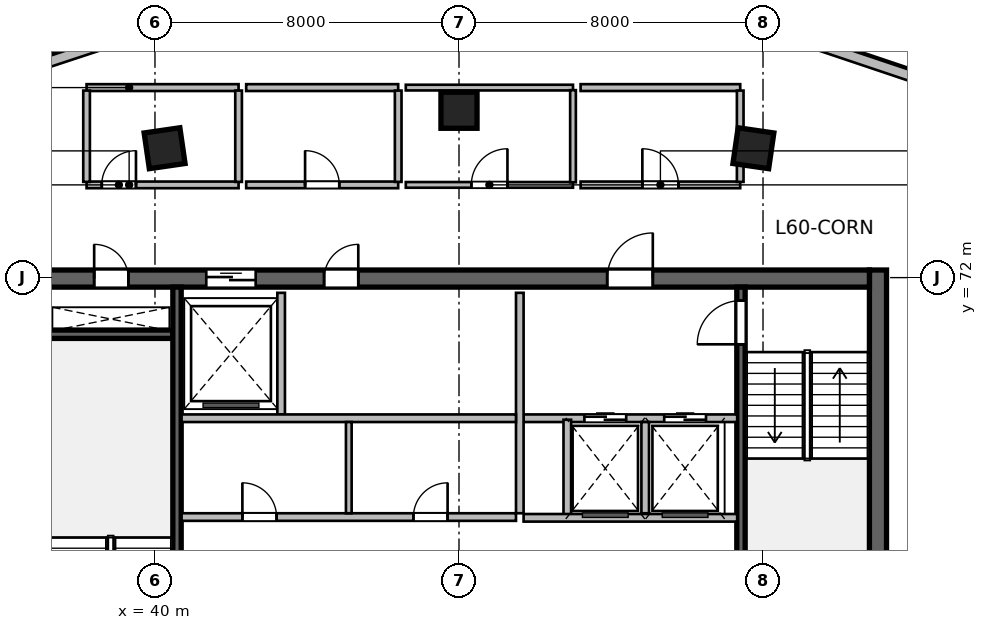
"""IFC4 building model, lengths in metres.
Left out: names, types, materials, properties, quantities, classifications, styles, units other than length and angle.
Written with IfcOpenShell. Run it as: python <this file> out.ifc"""

import sys

from ifc_helpers import new_model, si_unit, direction, frame, frame_2d, origin, origin_2d, place, context, subcontext, project, spatial, rectangle, extrude, source, transform, mapped, element, fill, save


model = new_model("IFC4")
c1 = context("Model", 3, precision=1e-05, world=origin(), true_north=direction((0.0, 1.0)))
c2 = subcontext(c1, "Body", "Model", "MODEL_VIEW")
j1 = project(units=[si_unit("LENGTHUNIT", "METRE"), si_unit("PLANEANGLEUNIT", "RADIAN")], contexts=[c1])
p1 = place(None, origin())
s1 = spatial("IfcSite", under=j1, at=p1, CompositionType="ELEMENT")
p2 = place(p1, origin())
s2 = spatial("IfcBuilding", under=s1, at=p2, CompositionType="ELEMENT")
p3 = place(p2, frame((0.0, 0.0, 246.9)))
s3 = spatial("IfcBuildingStorey", under=s2, at=p3, CompositionType="ELEMENT", Elevation=246.9)
m1 = source(origin(), c2, "Body", "SweptSolid", [
    extrude(rectangle(XDim=12.0, YDim=0.45, at=frame_2d((6.0, 0.0))), origin(), (0.0, 0.0, 1.0), 3.9),
])
p4 = place(p3, frame((59.025, 60.2, 0.0), z_axis=(0.0, 0.0, 1.0), x_axis=(0.0, 1.0, 0.0)))
e1 = element("IfcWall", 1, at=p4, inside=s3, PredefinedType="SHEAR", context=c2, shape_type="MappedRepresentation", body=[
    mapped(m1, transform((0.0, 0.0, 0.0), scale=1.0)),
])
m2 = source(origin(), c2, "Body", "SweptSolid", [
    extrude(rectangle(XDim=21.6, YDim=0.45, at=frame_2d((10.8, 0.0))), origin(), (0.0, 0.0, 1.0), 3.9),
])
p5 = place(p3, frame((37.2, 71.975, 0.0), z_axis=(0.0, 0.0, 1.0), x_axis=(1.0, 0.0, 0.0)))
e2 = element("IfcWall", 2, at=p5, inside=s3, PredefinedType="SHEAR", context=c2, shape_type="MappedRepresentation", body=[
    mapped(m2, transform((0.0, 0.0, 0.0), scale=1.0)),
])
p6 = place(p5, frame((1.2, 0.0, 0.0)))
e3 = element("IfcOpeningElement", 3, at=p6, cuts=e2, PredefinedType="OPENING", context=c2, shape_type="SweptSolid", body=[
    extrude(rectangle(XDim=0.9, YDim=2.1, at=frame_2d((0.45, 1.05))), frame((0.0, 0.235, 0.0), z_axis=(0.0, -1.0, 0.0), x_axis=(1.0, 0.0, 0.0)), (0.0, 0.0, 1.0), 0.47),
])
p7 = place(p5, frame((14.7, 0.0, 0.0)))
e4 = element("IfcOpeningElement", 4, at=p7, cuts=e2, PredefinedType="OPENING", context=c2, shape_type="SweptSolid", body=[
    extrude(rectangle(XDim=1.2, YDim=2.15, at=frame_2d((0.6, 1.075))), frame((0.0, 0.235, 0.0), z_axis=(0.0, -1.0, 0.0), x_axis=(1.0, 0.0, 0.0)), (0.0, 0.0, 1.0), 0.47),
])
p8 = place(p5, frame((4.15, 0.0, 0.0)))
e5 = element("IfcOpeningElement", 5, at=p8, cuts=e2, PredefinedType="OPENING", context=c2, shape_type="SweptSolid", body=[
    extrude(rectangle(XDim=1.3, YDim=2.15, at=frame_2d((0.65, 1.075))), frame((0.0, 0.235, 0.0), z_axis=(0.0, -1.0, 0.0), x_axis=(1.0, 0.0, 0.0)), (0.0, 0.0, 1.0), 0.47),
])
p9 = place(p5, frame((7.25, 0.0, 0.0)))
e6 = element("IfcOpeningElement", 6, at=p9, cuts=e2, PredefinedType="OPENING", context=c2, shape_type="SweptSolid", body=[
    extrude(rectangle(XDim=0.9, YDim=2.1, at=frame_2d((0.45, 1.05))), frame((0.0, 0.235, 0.0), z_axis=(0.0, -1.0, 0.0), x_axis=(1.0, 0.0, 0.0)), (0.0, 0.0, 1.0), 0.47),
])
m3 = source(origin(), c2, "Body", "SweptSolid", [
    extrude(rectangle(XDim=3.27, YDim=0.22, at=frame_2d((1.635, 0.0))), origin(), (0.0, 0.0, 1.0), 3.9),
])
p10 = place(p3, frame((37.2, 70.51, 0.0), z_axis=(0.0, 0.0, 1.0), x_axis=(1.0, 0.0, 0.0)))
e7 = element("IfcWall", 7, at=p10, inside=s3, PredefinedType="SHEAR", context=c2, shape_type="MappedRepresentation", body=[
    mapped(m3, transform((0.0, 0.0, 0.0), scale=1.0)),
])
m4 = source(origin(), c2, "Body", "SweptSolid", [
    extrude(rectangle(XDim=11.1, YDim=0.22, at=frame_2d((5.55, 0.0))), origin(), (0.0, 0.0, 1.0), 3.9),
])
p11 = place(p3, frame((40.58, 60.65, 0.0), z_axis=(0.0, 0.0, 1.0), x_axis=(0.0, 1.0, 0.0)))
e8 = element("IfcWall", 8, at=p11, inside=s3, PredefinedType="SHEAR", context=c2, shape_type="MappedRepresentation", body=[
    mapped(m4, transform((0.0, 0.0, 0.0), scale=1.0)),
])
p12 = place(p3, frame((55.42, 60.65, 0.0), z_axis=(0.0, 0.0, 1.0), x_axis=(0.0, 1.0, 0.0)))
e9 = element("IfcWall", 9, at=p12, inside=s3, PredefinedType="SHEAR", context=c2, shape_type="MappedRepresentation", body=[
    mapped(m4, transform((0.0, 0.0, 0.0), scale=1.0)),
])
p13 = place(p12, frame((9.595, 0.0, 0.0)))
e10 = element("IfcOpeningElement", 10, at=p13, cuts=e9, PredefinedType="OPENING", context=c2, shape_type="SweptSolid", body=[
    extrude(rectangle(XDim=1.15, YDim=2.15, at=frame_2d((0.575, 1.075))), frame((0.0, 0.12, 0.0), z_axis=(0.0, -1.0, 0.0), x_axis=(1.0, 0.0, 0.0)), (0.0, 0.0, 1.0), 0.24),
])
m5 = source(origin(), c2, "Body", "SweptSolid", [
    extrude(rectangle(XDim=0.95, YDim=0.95, at=origin_2d()), origin(), (0.0, 0.0, 1.0), 3.9),
])
for number, where, z_axis, x_axis in (
    (11, (40.253, 75.404, 0.0), (0.0, 0.0, 1.0), (-0.143, 0.99, 0.0)),
    (12, (48.0, 76.404, 0.0), (0.0, 0.0, 1.0), (0.0, 1.0, 0.0)),
    (13, (55.747, 75.404, 0.0), (0.0, 0.0, 1.0), (0.143, 0.99, 0.0)),
):
    element("IfcColumn", number, at=place(p3, frame(where, z_axis=z_axis, x_axis=x_axis)), inside=s3, PredefinedType="COLUMN", context=c2, shape_type="MappedRepresentation", body=[
        mapped(m5, transform((0.0, 0.0, 0.0), scale=1.0)),
    ])
m6 = source(origin(), c2, "Body", "SweptSolid", [
    extrude(rectangle(XDim=3.557, YDim=0.28, at=frame_2d((1.778, 0.0))), origin(), (0.0, 0.0, 1.0), 3.65),
])
p14 = place(p3, frame((36.077, 77.307, 0.0), z_axis=(0.0, 0.0, 1.0), x_axis=(0.949687460385, 0.31319918197, 0.0)))
e14 = element("IfcWall", 14, at=p14, inside=s3, PredefinedType="SOLIDWALL", context=c2, shape_type="MappedRepresentation", body=[
    mapped(m6, transform((0.0, 0.0, 0.0), scale=1.0)),
])
m7 = source(origin(), c2, "Body", "SweptSolid", [
    extrude(rectangle(XDim=3.559, YDim=0.28, at=frame_2d((1.78, 0.0))), origin(), (0.0, 0.0, 1.0), 3.65),
])
p15 = place(p3, frame((56.729, 78.37, 0.0), z_axis=(0.0, 0.0, 1.0), x_axis=(0.947933000453, -0.31846982063, 0.0)))
e15 = element("IfcWall", 15, at=p15, inside=s3, PredefinedType="SOLIDWALL", context=c2, shape_type="MappedRepresentation", body=[
    mapped(m7, transform((0.0, 0.0, 0.0), scale=1.0)),
])
m8 = source(origin(), c2, "Body", "SweptSolid", [
    extrude(rectangle(XDim=5.62, YDim=0.2, at=frame_2d((2.81, 0.0))), origin(), (0.0, 0.0, 1.0), 3.65),
])
p16 = place(p3, frame((49.7, 68.3, 0.0), z_axis=(0.0, 0.0, 1.0), x_axis=(1.0, 0.0, 0.0)))
e16 = element("IfcWall", 16, at=p16, inside=s3, PredefinedType="SOLIDWALL", context=c2, shape_type="MappedRepresentation", body=[
    mapped(m8, transform((0.0, 0.0, 0.0), scale=1.0)),
])
p17 = place(p16, frame((1.6, 0.0, 0.0)))
e17 = element("IfcOpeningElement", 17, at=p17, cuts=e16, PredefinedType="OPENING", context=c2, shape_type="SweptSolid", body=[
    extrude(rectangle(XDim=1.1, YDim=2.15, at=frame_2d((0.55, 1.075))), frame((0.0, 0.11, 0.0), z_axis=(0.0, -1.0, 0.0), x_axis=(1.0, 0.0, 0.0)), (0.0, 0.0, 1.0), 0.22),
])
p18 = place(p16, frame((3.7, 0.0, 0.0)))
e18 = element("IfcOpeningElement", 18, at=p18, cuts=e16, PredefinedType="OPENING", context=c2, shape_type="SweptSolid", body=[
    extrude(rectangle(XDim=1.1, YDim=2.15, at=frame_2d((0.55, 1.075))), frame((0.0, 0.11, 0.0), z_axis=(0.0, -1.0, 0.0), x_axis=(1.0, 0.0, 0.0)), (0.0, 0.0, 1.0), 0.22),
])
m9 = source(origin(), c2, "Body", "SweptSolid", [
    extrude(rectangle(XDim=5.8, YDim=0.2, at=frame_2d((2.9, 0.0))), origin(), (0.0, 0.0, 1.0), 3.65),
])
p19 = place(p3, frame((49.6, 65.8, 0.0), z_axis=(0.0, 0.0, 1.0), x_axis=(0.0, 1.0, 0.0)))
e19 = element("IfcWall", 19, at=p19, inside=s3, PredefinedType="SOLIDWALL", context=c2, shape_type="MappedRepresentation", body=[
    mapped(m9, transform((0.0, 0.0, 0.0), scale=1.0)),
])
m10 = source(origin(), c2, "Body", "SweptSolid", [
    extrude(rectangle(XDim=2.58, YDim=0.2, at=frame_2d((1.29, 0.0))), origin(), (0.0, 0.0, 1.0), 3.65),
])
p20 = place(p3, frame((50.85, 65.68, 0.0), z_axis=(0.0, 0.0, 1.0), x_axis=(0.0, 1.0, 0.0)))
e20 = element("IfcWall", 20, at=p20, inside=s3, PredefinedType="SOLIDWALL", context=c2, shape_type="MappedRepresentation", body=[
    mapped(m10, transform((0.0, 0.0, 0.0), scale=1.0)),
])
m11 = source(origin(), c2, "Body", "SweptSolid", [
    extrude(rectangle(XDim=2.4, YDim=0.2, at=frame_2d((1.2, 0.0))), origin(), (0.0, 0.0, 1.0), 3.65),
])
p21 = place(p3, frame((52.9, 65.8, 0.0), z_axis=(0.0, 0.0, 1.0), x_axis=(0.0, 1.0, 0.0)))
e21 = element("IfcWall", 21, at=p21, inside=s3, PredefinedType="SOLIDWALL", context=c2, shape_type="MappedRepresentation", body=[
    mapped(m11, transform((0.0, 0.0, 0.0), scale=1.0)),
])
p22 = place(p3, frame((49.7, 65.68, 0.0), z_axis=(0.0, 0.0, 1.0), x_axis=(1.0, 0.0, 0.0)))
e22 = element("IfcWall", 22, at=p22, inside=s3, PredefinedType="SOLIDWALL", context=c2, shape_type="MappedRepresentation", body=[
    mapped(m8, transform((0.0, 0.0, 0.0), scale=1.0)),
])
m12 = source(origin(), c2, "Body", "SweptSolid", [
    extrude(rectangle(XDim=3.2, YDim=0.2, at=frame_2d((1.6, 0.0))), origin(), (0.0, 0.0, 1.0), 3.65),
])
p23 = place(p3, frame((43.32, 68.4, 0.0), z_axis=(0.0, 0.0, 1.0), x_axis=(0.0, 1.0, 0.0)))
e23 = element("IfcWall", 23, at=p23, inside=s3, PredefinedType="SOLIDWALL", context=c2, shape_type="MappedRepresentation", body=[
    mapped(m12, transform((0.0, 0.0, 0.0), scale=1.0)),
])
m13 = source(origin(), c2, "Body", "SweptSolid", [
    extrude(rectangle(XDim=8.8, YDim=0.2, at=frame_2d((4.4, 0.0))), origin(), (0.0, 0.0, 1.0), 3.65),
])
p24 = place(p3, frame((40.7, 68.3, 0.0), z_axis=(0.0, 0.0, 1.0), x_axis=(1.0, 0.0, 0.0)))
e24 = element("IfcWall", 24, at=p24, inside=s3, PredefinedType="SOLIDWALL", context=c2, shape_type="MappedRepresentation", body=[
    mapped(m13, transform((0.0, 0.0, 0.0), scale=1.0)),
])
p25 = place(p3, frame((40.7, 65.7, 0.0), z_axis=(0.0, 0.0, 1.0), x_axis=(1.0, 0.0, 0.0)))
e25 = element("IfcWall", 25, at=p25, inside=s3, PredefinedType="SOLIDWALL", context=c2, shape_type="MappedRepresentation", body=[
    mapped(m13, transform((0.0, 0.0, 0.0), scale=1.0)),
])
p26 = place(p25, frame((1.6, 0.0, 0.0)))
e26 = element("IfcOpeningElement", 26, at=p26, cuts=e25, PredefinedType="OPENING", context=c2, shape_type="SweptSolid", body=[
    extrude(rectangle(XDim=0.9, YDim=2.1, at=frame_2d((0.45, 1.05))), frame((0.0, 0.11, 0.0), z_axis=(0.0, -1.0, 0.0), x_axis=(1.0, 0.0, 0.0)), (0.0, 0.0, 1.0), 0.22),
])
p27 = place(p25, frame((6.1, 0.0, 0.0)))
e27 = element("IfcOpeningElement", 27, at=p27, cuts=e25, PredefinedType="OPENING", context=c2, shape_type="SweptSolid", body=[
    extrude(rectangle(XDim=0.9, YDim=2.1, at=frame_2d((0.45, 1.05))), frame((0.0, 0.11, 0.0), z_axis=(0.0, -1.0, 0.0), x_axis=(1.0, 0.0, 0.0)), (0.0, 0.0, 1.0), 0.22),
])
m14 = source(origin(), c2, "Body", "SweptSolid", [
    extrude(rectangle(XDim=2.4, YDim=0.15, at=frame_2d((1.2, 0.0))), origin(), (0.0, 0.0, 1.0), 3.65),
])
p28 = place(p3, frame((45.1, 65.8, 0.0), z_axis=(0.0, 0.0, 1.0), x_axis=(0.0, 1.0, 0.0)))
e28 = element("IfcWall", 28, at=p28, inside=s3, PredefinedType="PARTITIONING", context=c2, shape_type="MappedRepresentation", body=[
    mapped(m14, transform((0.0, 0.0, 0.0), scale=1.0)),
])
m15 = source(origin(), c2, "Body", "SweptSolid", [
    extrude(rectangle(XDim=4.0, YDim=0.175, at=frame_2d((2.0, 0.0))), origin(), (0.0, 0.0, 1.0), 3.65),
])
p29 = place(p3, frame((38.2, 74.44, 0.0), z_axis=(0.0, 0.0, 1.0), x_axis=(1.0, 0.0, 0.0)))
e29 = element("IfcWall", 29, at=p29, inside=s3, PredefinedType="PARTITIONING", context=c2, shape_type="MappedRepresentation", body=[
    mapped(m15, transform((0.0, 0.0, 0.0), scale=1.0)),
])
p30 = place(p29, frame((0.4, 0.0, 0.0)))
e30 = element("IfcOpeningElement", 30, at=p30, cuts=e29, PredefinedType="OPENING", context=c2, shape_type="SweptSolid", body=[
    extrude(rectangle(XDim=0.9, YDim=2.08, at=frame_2d((0.45, 1.04))), frame((0.0, 0.098, 0.0), z_axis=(0.0, -1.0, 0.0), x_axis=(1.0, 0.0, 0.0)), (0.0, 0.0, 1.0), 0.195),
])
m16 = source(origin(), c2, "Body", "SweptSolid", [
    extrude(rectangle(XDim=4.0, YDim=0.18, at=frame_2d((2.0, 0.0))), origin(), (0.0, 0.0, 1.0), 3.65),
])
p31 = place(p3, frame((38.2, 77.0, 0.0), z_axis=(0.0, 0.0, 1.0), x_axis=(1.0, 0.0, 0.0)))
e31 = element("IfcWall", 31, at=p31, inside=s3, PredefinedType="PLUMBINGWALL", context=c2, shape_type="MappedRepresentation", body=[
    mapped(m16, transform((0.0, 0.0, 0.0), scale=1.0)),
])
m17 = source(origin(), c2, "Body", "SweptSolid", [
    extrude(rectangle(XDim=2.403, YDim=0.175, at=frame_2d((1.201, 0.0))), origin(), (0.0, 0.0, 1.0), 3.65),
])
for number, where, z_axis, x_axis in (
    (32, (38.2, 74.519, 0.0), (0.0, 0.0, 1.0), (0.0, 1.0, 0.0)),
    (33, (42.2, 74.519, 0.0), (0.0, 0.0, 1.0), (0.0, 1.0, 0.0)),
):
    element("IfcWall", number, at=place(p3, frame(where, z_axis=z_axis, x_axis=x_axis)), inside=s3, PredefinedType="PARTITIONING", context=c2, shape_type="MappedRepresentation", body=[
        mapped(m17, transform((0.0, 0.0, 0.0), scale=1.0)),
    ])
p32 = place(p3, frame((42.4, 74.44, 0.0), z_axis=(0.0, 0.0, 1.0), x_axis=(1.0, 0.0, 0.0)))
e34 = element("IfcWall", 34, at=p32, inside=s3, PredefinedType="PARTITIONING", context=c2, shape_type="MappedRepresentation", body=[
    mapped(m15, transform((0.0, 0.0, 0.0), scale=1.0)),
])
p33 = place(p32, frame((1.55, 0.0, 0.0)))
e35 = element("IfcOpeningElement", 35, at=p33, cuts=e34, PredefinedType="OPENING", context=c2, shape_type="SweptSolid", body=[
    extrude(rectangle(XDim=0.9, YDim=2.08, at=frame_2d((0.45, 1.04))), frame((0.0, 0.098, 0.0), z_axis=(0.0, -1.0, 0.0), x_axis=(1.0, 0.0, 0.0)), (0.0, 0.0, 1.0), 0.195),
])
p34 = place(p3, frame((42.4, 77.0, 0.0), z_axis=(0.0, 0.0, 1.0), x_axis=(1.0, 0.0, 0.0)))
e36 = element("IfcWall", 36, at=p34, inside=s3, PredefinedType="PLUMBINGWALL", context=c2, shape_type="MappedRepresentation", body=[
    mapped(m16, transform((0.0, 0.0, 0.0), scale=1.0)),
])
p35 = place(p3, frame((46.4, 74.519, 0.0), z_axis=(0.0, 0.0, 1.0), x_axis=(0.0, 1.0, 0.0)))
e37 = element("IfcWall", 37, at=p35, inside=s3, PredefinedType="PARTITIONING", context=c2, shape_type="MappedRepresentation", body=[
    mapped(m17, transform((0.0, 0.0, 0.0), scale=1.0)),
])
m18 = source(origin(), c2, "Body", "SweptSolid", [
    extrude(rectangle(XDim=4.4, YDim=0.15, at=frame_2d((2.2, 0.0))), origin(), (0.0, 0.0, 1.0), 3.65),
])
p36 = place(p3, frame((46.6, 74.44, 0.0), z_axis=(0.0, 0.0, 1.0), x_axis=(1.0, 0.0, 0.0)))
e38 = element("IfcWall", 38, at=p36, inside=s3, PredefinedType="PARTITIONING", context=c2, shape_type="MappedRepresentation", body=[
    mapped(m18, transform((0.0, 0.0, 0.0), scale=1.0)),
])
p37 = place(p36, frame((1.725, 0.0, 0.0)))
e39 = element("IfcOpeningElement", 39, at=p37, cuts=e38, PredefinedType="OPENING", context=c2, shape_type="SweptSolid", body=[
    extrude(rectangle(XDim=0.95, YDim=2.1, at=frame_2d((0.475, 1.05))), frame((0.0, 0.085, 0.0), z_axis=(0.0, -1.0, 0.0), x_axis=(1.0, 0.0, 0.0)), (0.0, 0.0, 1.0), 0.17),
])
p38 = place(p3, frame((46.6, 77.0, 0.0), z_axis=(0.0, 0.0, 1.0), x_axis=(1.0, 0.0, 0.0)))
e40 = element("IfcWall", 40, at=p38, inside=s3, PredefinedType="PARTITIONING", context=c2, shape_type="MappedRepresentation", body=[
    mapped(m18, transform((0.0, 0.0, 0.0), scale=1.0)),
])
m19 = source(origin(), c2, "Body", "SweptSolid", [
    extrude(rectangle(XDim=2.425, YDim=0.15, at=frame_2d((1.212, 0.0))), origin(), (0.0, 0.0, 1.0), 3.65),
])
p39 = place(p3, frame((51.0, 74.508, 0.0), z_axis=(0.0, 0.0, 1.0), x_axis=(0.0, 1.0, 0.0)))
e41 = element("IfcWall", 41, at=p39, inside=s3, PredefinedType="PARTITIONING", context=c2, shape_type="MappedRepresentation", body=[
    mapped(m19, transform((0.0, 0.0, 0.0), scale=1.0)),
])
m20 = source(origin(), c2, "Body", "SweptSolid", [
    extrude(rectangle(XDim=4.2, YDim=0.175, at=frame_2d((2.1, 0.0))), origin(), (0.0, 0.0, 1.0), 3.65),
])
p40 = place(p3, frame((51.2, 74.44, 0.0), z_axis=(0.0, 0.0, 1.0), x_axis=(1.0, 0.0, 0.0)))
e42 = element("IfcWall", 42, at=p40, inside=s3, PredefinedType="PARTITIONING", context=c2, shape_type="MappedRepresentation", body=[
    mapped(m20, transform((0.0, 0.0, 0.0), scale=1.0)),
])
p41 = place(p40, frame((1.625, 0.0, 0.0)))
e43 = element("IfcOpeningElement", 43, at=p41, cuts=e42, PredefinedType="OPENING", context=c2, shape_type="SweptSolid", body=[
    extrude(rectangle(XDim=0.95, YDim=2.12, at=frame_2d((0.475, 1.06))), frame((0.0, 0.098, 0.0), z_axis=(0.0, -1.0, 0.0), x_axis=(1.0, 0.0, 0.0)), (0.0, 0.0, 1.0), 0.195),
])
m21 = source(origin(), c2, "Body", "SweptSolid", [
    extrude(rectangle(XDim=4.2, YDim=0.18, at=frame_2d((2.1, 0.0))), origin(), (0.0, 0.0, 1.0), 3.65),
])
p42 = place(p3, frame((51.2, 77.0, 0.0), z_axis=(0.0, 0.0, 1.0), x_axis=(1.0, 0.0, 0.0)))
e44 = element("IfcWall", 44, at=p42, inside=s3, PredefinedType="PLUMBINGWALL", context=c2, shape_type="MappedRepresentation", body=[
    mapped(m21, transform((0.0, 0.0, 0.0), scale=1.0)),
])
p43 = place(p3, frame((55.4, 74.519, 0.0), z_axis=(0.0, 0.0, 1.0), x_axis=(0.0, 1.0, 0.0)))
e45 = element("IfcWall", 45, at=p43, inside=s3, PredefinedType="PARTITIONING", context=c2, shape_type="MappedRepresentation", body=[
    mapped(m17, transform((0.0, 0.0, 0.0), scale=1.0)),
])
m22 = source(origin(), c2, "Body", "SweptSolid", [
    extrude(rectangle(XDim=13.161, YDim=0.195, at=frame_2d((6.581, 0.0))), origin(), (0.0, 0.0, 1.0), 3.65),
])
p44 = place(p3, frame((59.5, 63.216, 0.0), z_axis=(0.0, 0.0, 1.0), x_axis=(0.268752541286, 0.963209256368, 0.0)))
e46 = element("IfcWall", 46, at=p44, inside=s3, PredefinedType="PARTITIONING", context=c2, shape_type="MappedRepresentation", body=[
    mapped(m22, transform((0.0, 0.0, 0.0), scale=1.0)),
])
m23 = source(origin(), c2, "Body", "SweptSolid", [
    extrude(rectangle(XDim=0.9, YDim=2.1, at=frame_2d((0.45, 1.05))), frame((0.0, 0.025, 0.0), z_axis=(0.0, -1.0, 0.0), x_axis=(1.0, 0.0, 0.0)), (0.0, 0.0, 1.0), 0.05),
])
p45 = place(p6, origin())
e47 = element("IfcDoor", 47, at=p45, inside=s3, OperationType="SINGLE_SWING_LEFT", PredefinedType="DOOR", context=c2, shape_type="MappedRepresentation", body=[
    mapped(m23, transform((0.0, 0.0, 0.0), scale=1.0)),
])
fill(e3, e47)
m24 = source(origin(), c2, "Body", "SweptSolid", [
    extrude(rectangle(XDim=1.15, YDim=2.15, at=frame_2d((0.575, 1.075))), frame((0.0, 0.025, 0.0), z_axis=(0.0, -1.0, 0.0), x_axis=(1.0, 0.0, 0.0)), (0.0, 0.0, 1.0), 0.05),
])
p46 = place(p13, origin())
e48 = element("IfcDoor", 48, at=p46, inside=s3, OperationType="SINGLE_SWING_LEFT", PredefinedType="DOOR", context=c2, shape_type="MappedRepresentation", body=[
    mapped(m24, transform((0.0, 0.0, 0.0), scale=1.0)),
])
fill(e10, e48)
m25 = source(origin(), c2, "Body", "SweptSolid", [
    extrude(rectangle(XDim=1.2, YDim=2.15, at=frame_2d((0.6, 1.075))), frame((0.0, 0.025, 0.0), z_axis=(0.0, -1.0, 0.0), x_axis=(1.0, 0.0, 0.0)), (0.0, 0.0, 1.0), 0.05),
])
p47 = place(p7, origin())
e49 = element("IfcDoor", 49, at=p47, inside=s3, OperationType="SINGLE_SWING_RIGHT", PredefinedType="DOOR", context=c2, shape_type="MappedRepresentation", body=[
    mapped(m25, transform((0.0, 0.0, 0.0), scale=1.0)),
])
fill(e4, e49)
m26 = source(origin(), c2, "Body", "SweptSolid", [
    extrude(rectangle(XDim=1.1, YDim=2.15, at=frame_2d((0.55, 1.075))), frame((0.0, 0.025, 0.0), z_axis=(0.0, -1.0, 0.0), x_axis=(1.0, 0.0, 0.0)), (0.0, 0.0, 1.0), 0.05),
])
p48 = place(p17, origin())
e50 = element("IfcDoor", 50, at=p48, inside=s3, OperationType="DOUBLE_DOOR_SLIDING", PredefinedType="DOOR", context=c2, shape_type="MappedRepresentation", body=[
    mapped(m26, transform((0.0, 0.0, 0.0), scale=1.0)),
])
fill(e17, e50)
p49 = place(p18, origin())
e51 = element("IfcDoor", 51, at=p49, inside=s3, OperationType="DOUBLE_DOOR_SLIDING", PredefinedType="DOOR", context=c2, shape_type="MappedRepresentation", body=[
    mapped(m26, transform((0.0, 0.0, 0.0), scale=1.0)),
])
fill(e18, e51)
m27 = source(origin(), c2, "Body", "SweptSolid", [
    extrude(rectangle(XDim=1.3, YDim=2.15, at=frame_2d((0.65, 1.075))), frame((0.0, 0.025, 0.0), z_axis=(0.0, -1.0, 0.0), x_axis=(1.0, 0.0, 0.0)), (0.0, 0.0, 1.0), 0.05),
])
p50 = place(p8, origin())
e52 = element("IfcDoor", 52, at=p50, inside=s3, OperationType="DOUBLE_DOOR_SLIDING", PredefinedType="DOOR", context=c2, shape_type="MappedRepresentation", body=[
    mapped(m27, transform((0.0, 0.0, 0.0), scale=1.0)),
])
fill(e5, e52)
p51 = place(p9, origin())
e53 = element("IfcDoor", 53, at=p51, inside=s3, OperationType="SINGLE_SWING_RIGHT", PredefinedType="DOOR", context=c2, shape_type="MappedRepresentation", body=[
    mapped(m23, transform((0.0, 0.0, 0.0), scale=1.0)),
])
fill(e6, e53)
p52 = place(p26, origin())
e54 = element("IfcDoor", 54, at=p52, inside=s3, OperationType="SINGLE_SWING_LEFT", PredefinedType="DOOR", context=c2, shape_type="MappedRepresentation", body=[
    mapped(m23, transform((0.0, 0.0, 0.0), scale=1.0)),
])
fill(e26, e54)
p53 = place(p27, origin())
e55 = element("IfcDoor", 55, at=p53, inside=s3, OperationType="SINGLE_SWING_RIGHT", PredefinedType="DOOR", context=c2, shape_type="MappedRepresentation", body=[
    mapped(m23, transform((0.0, 0.0, 0.0), scale=1.0)),
])
fill(e27, e55)
m28 = source(origin(), c2, "Body", "SweptSolid", [
    extrude(rectangle(XDim=0.9, YDim=2.08, at=frame_2d((0.45, 1.04))), frame((0.0, 0.025, 0.0), z_axis=(0.0, -1.0, 0.0), x_axis=(1.0, 0.0, 0.0)), (0.0, 0.0, 1.0), 0.05),
])
p54 = place(p30, origin())
e56 = element("IfcDoor", 56, at=p54, inside=s3, OperationType="SINGLE_SWING_RIGHT", PredefinedType="DOOR", context=c2, shape_type="MappedRepresentation", body=[
    mapped(m28, transform((0.0, 0.0, 0.0), scale=1.0)),
])
fill(e30, e56)
p55 = place(p33, origin())
e57 = element("IfcDoor", 57, at=p55, inside=s3, OperationType="SINGLE_SWING_LEFT", PredefinedType="DOOR", context=c2, shape_type="MappedRepresentation", body=[
    mapped(m28, transform((0.0, 0.0, 0.0), scale=1.0)),
])
fill(e35, e57)
m29 = source(origin(), c2, "Body", "SweptSolid", [
    extrude(rectangle(XDim=0.95, YDim=2.1, at=frame_2d((0.475, 1.05))), frame((0.0, 0.025, 0.0), z_axis=(0.0, -1.0, 0.0), x_axis=(1.0, 0.0, 0.0)), (0.0, 0.0, 1.0), 0.05),
])
p56 = place(p37, origin())
e58 = element("IfcDoor", 58, at=p56, inside=s3, OperationType="SINGLE_SWING_RIGHT", PredefinedType="DOOR", context=c2, shape_type="MappedRepresentation", body=[
    mapped(m29, transform((0.0, 0.0, 0.0), scale=1.0)),
])
fill(e39, e58)
m30 = source(origin(), c2, "Body", "SweptSolid", [
    extrude(rectangle(XDim=0.95, YDim=2.12, at=frame_2d((0.475, 1.06))), frame((0.0, 0.025, 0.0), z_axis=(0.0, -1.0, 0.0), x_axis=(1.0, 0.0, 0.0)), (0.0, 0.0, 1.0), 0.05),
])
p57 = place(p41, origin())
e59 = element("IfcDoor", 59, at=p57, inside=s3, OperationType="SINGLE_SWING_LEFT", PredefinedType="DOOR", context=c2, shape_type="MappedRepresentation", body=[
    mapped(m30, transform((0.0, 0.0, 0.0), scale=1.0)),
])
fill(e43, e59)
save(model, sys.argv[1])
